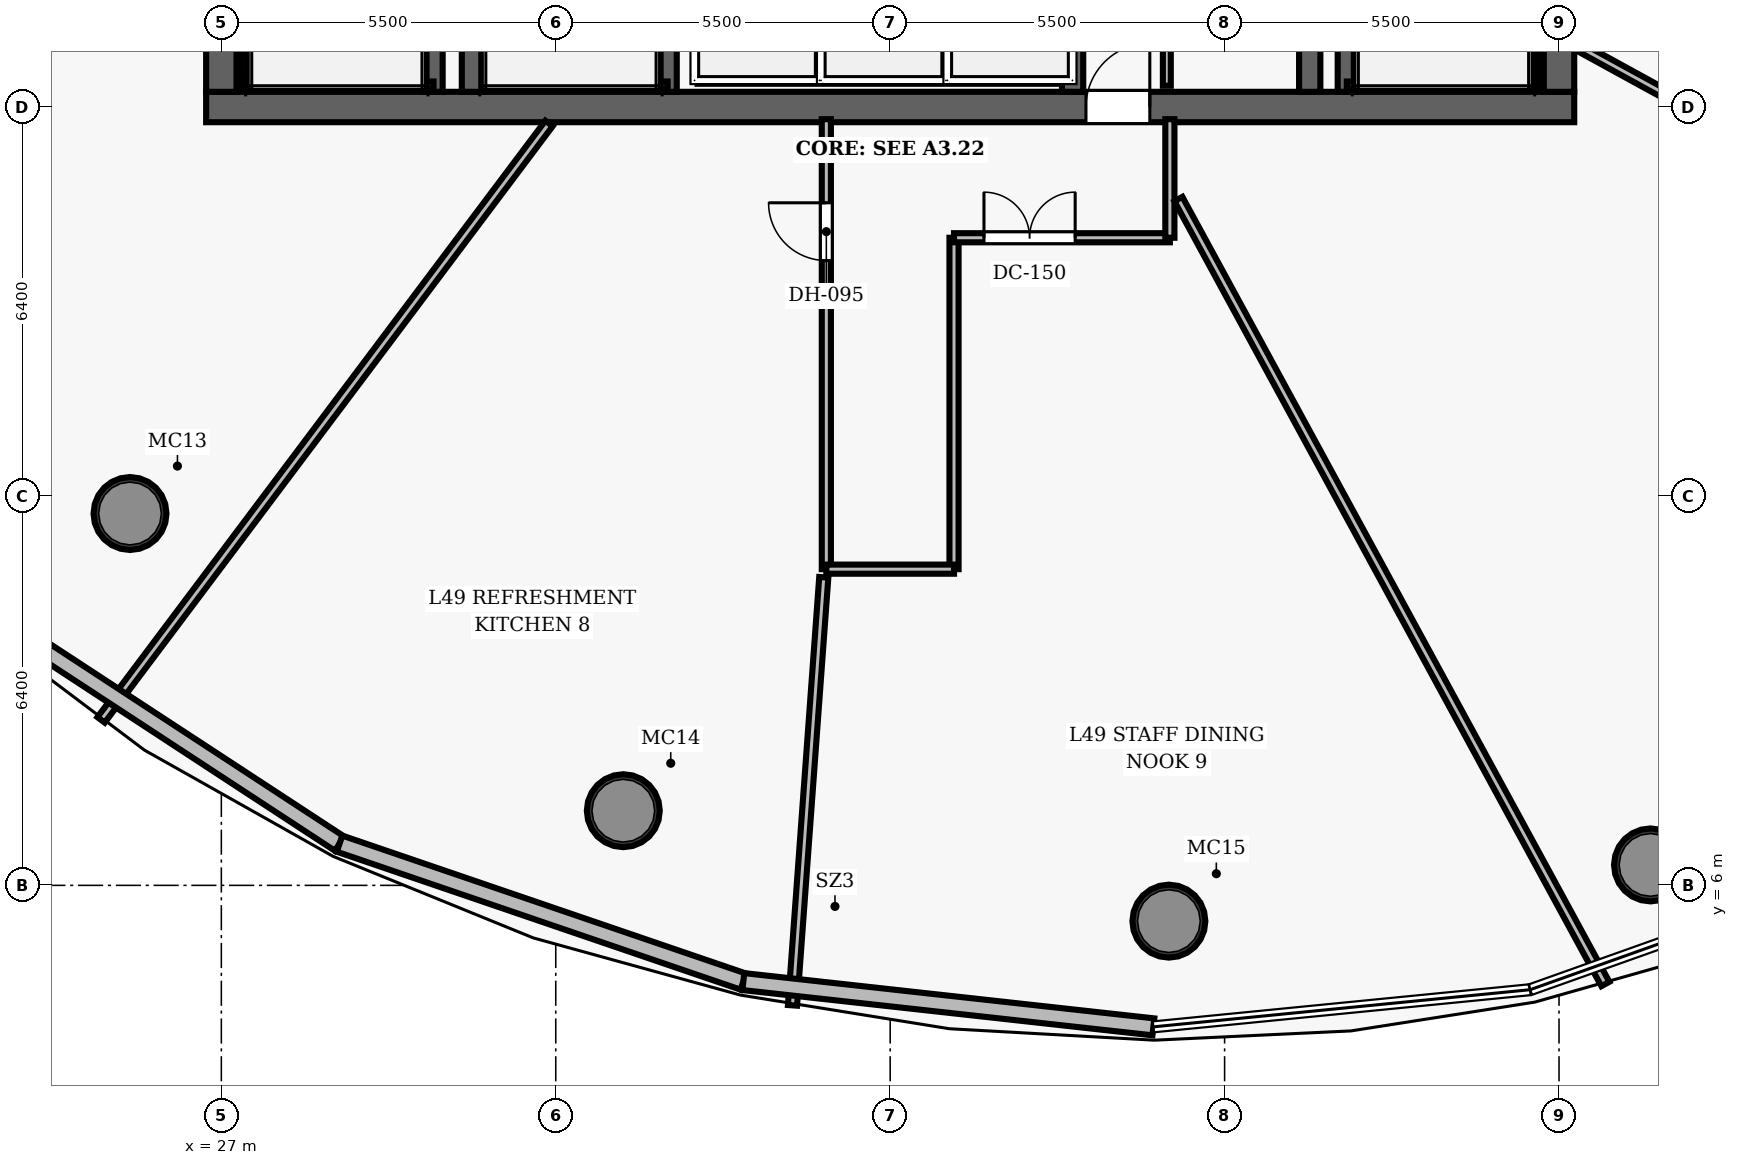
"""IFC4 building model, lengths in metres.
Left out: names, types, materials, properties, quantities, classifications, styles, units other than length and angle.
Written with IfcOpenShell. Run it as: python <this file> out.ifc"""

import sys

from ifc_helpers import new_model, si_unit, direction, frame, frame_2d, origin, origin_2d, place, context, subcontext, project, spatial, rectangle, hollow_circle, extrude, element, fill, save


model = new_model("IFC4")
c1 = context("Model", 3, precision=1e-05, world=origin(), true_north=direction((0.0, 1.0)))
c2 = subcontext(c1, "Body", "Model", "MODEL_VIEW")
j1 = project(units=[si_unit("LENGTHUNIT", "METRE"), si_unit("PLANEANGLEUNIT", "RADIAN")], contexts=[c1])
p1 = place(None, origin())
s1 = spatial("IfcSite", under=j1, at=p1, CompositionType="ELEMENT")
p2 = place(p1, origin())
s2 = spatial("IfcBuilding", under=s1, at=p2, CompositionType="ELEMENT")
p3 = place(p2, frame((0.0, 0.0, 194.3)))
s3 = spatial("IfcBuildingStorey", under=s2, at=p3, CompositionType="ELEMENT", Elevation=194.3)
p4 = place(p3, frame((26.75, 18.8, 0.0), z_axis=(0.0, 0.0, 1.0), x_axis=(1.0, 0.0, 0.0)))
e1 = element("IfcWall", 1, at=p4, inside=s3, PredefinedType="SHEAR", context=c2, shape_type="SweptSolid", body=[
    extrude(rectangle(XDim=22.5, YDim=0.5, at=frame_2d((11.25, 0.0))), origin(), (0.0, 0.0, 1.0), 3.85),
])
p5 = place(p4, frame((14.47, 0.0, 0.0)))
e2 = element("IfcOpeningElement", 2, at=p5, cuts=e1, PredefinedType="OPENING", context=c2, shape_type="SweptSolid", body=[
    extrude(rectangle(XDim=1.05, YDim=2.15, at=frame_2d((0.525, 1.075))), frame((0.0, 0.26, 0.0), z_axis=(0.0, -1.0, 0.0), x_axis=(1.0, 0.0, 0.0)), (0.0, 0.0, 1.0), 0.52),
])
p6 = place(p3, frame((27.0, 19.05, 0.0), z_axis=(0.0, 0.0, 1.0), x_axis=(0.0, 1.0, 0.0)))
e3 = element("IfcWall", 3, at=p6, inside=s3, PredefinedType="SHEAR", context=c2, shape_type="SweptSolid", body=[
    extrude(rectangle(XDim=13.9, YDim=0.5, at=frame_2d((6.95, 0.0))), origin(), (0.0, 0.0, 1.0), 3.85),
])
p7 = place(p6, frame((8.2, 0.0, 0.0)))
e4 = element("IfcOpeningElement", 4, at=p7, cuts=e3, PredefinedType="OPENING", context=c2, shape_type="SweptSolid", body=[
    extrude(rectangle(XDim=1.05, YDim=2.15, at=frame_2d((0.525, 1.075))), frame((0.0, 0.26, 0.0), z_axis=(0.0, -1.0, 0.0), x_axis=(1.0, 0.0, 0.0)), (0.0, 0.0, 1.0), 0.52),
])
p8 = place(p3, frame((49.0, 19.05, 0.0), z_axis=(0.0, 0.0, 1.0), x_axis=(0.0, 1.0, 0.0)))
e5 = element("IfcWall", 5, at=p8, inside=s3, PredefinedType="SHEAR", context=c2, shape_type="SweptSolid", body=[
    extrude(rectangle(XDim=13.9, YDim=0.5, at=frame_2d((6.95, 0.0))), origin(), (0.0, 0.0, 1.0), 3.85),
])
p9 = place(p8, frame((8.2, 0.0, 0.0)))
e6 = element("IfcOpeningElement", 6, at=p9, cuts=e5, PredefinedType="OPENING", context=c2, shape_type="SweptSolid", body=[
    extrude(rectangle(XDim=1.05, YDim=2.15, at=frame_2d((0.525, 1.075))), frame((0.0, 0.26, 0.0), z_axis=(0.0, -1.0, 0.0), x_axis=(1.0, 0.0, 0.0)), (0.0, 0.0, 1.0), 0.52),
])
for number, where, z_axis, x_axis in (
    (7, (31.13, 19.05, 0.0), (0.0, 0.0, 1.0), (0.0, 1.0, 0.0)),
    (8, (44.9, 19.05, 0.0), (0.0, 0.0, 1.0), (0.0, 1.0, 0.0)),
):
    element("IfcWall", number, at=place(p3, frame(where, z_axis=z_axis, x_axis=x_axis)), inside=s3, PredefinedType="SHEAR", context=c2, shape_type="SweptSolid", body=[
        extrude(rectangle(XDim=13.9, YDim=0.35, at=frame_2d((6.95, 0.0))), origin(), (0.0, 0.0, 1.0), 3.85),
    ])
for number, where, z_axis, x_axis in (
    (9, (25.498, 12.115, 0.0), (0.0, 0.0, 1.0), (1.0, 0.0, 0.0)),
    (10, (33.611, 7.228, 0.0), (0.0, 0.0, 1.0), (1.0, 0.0, 0.0)),
    (11, (42.584, 5.412, 0.0), (0.0, 0.0, 1.0), (1.0, 0.0, 0.0)),
    (12, (50.504, 6.336, 0.0), (0.0, 0.0, 1.0), (1.0, 0.0, 0.0)),
):
    element("IfcColumn", number, at=place(p3, frame(where, z_axis=z_axis, x_axis=x_axis)), inside=s3, PredefinedType="COLUMN", context=c2, shape_type="SweptSolid", body=[
        extrude(hollow_circle(Radius=0.6, WallThickness=0.05, at=origin_2d()), origin(), (0.0, 0.0, 1.0), 3.85),
    ])
p10 = place(p3, frame((30.49, 19.05, 0.0), z_axis=(0.0, 0.0, 1.0), x_axis=(0.0, 1.0, 0.0)))
e13 = element("IfcWall", 13, at=p10, inside=s3, PredefinedType="SHEAR", context=c2, shape_type="SweptSolid", body=[
    extrude(rectangle(XDim=7.5, YDim=0.3, at=frame_2d((3.75, 0.0))), origin(), (0.0, 0.0, 1.0), 3.85),
])
p11 = place(p3, frame((27.395, 19.1, 0.0), z_axis=(0.0, 0.0, 1.0), x_axis=(0.0, 1.0, 0.0)))
e14 = element("IfcWall", 14, at=p11, inside=s3, PredefinedType="SHEAR", context=c2, shape_type="SweptSolid", body=[
    extrude(rectangle(XDim=7.45, YDim=0.12, at=frame_2d((3.725, 0.0))), origin(), (0.0, 0.0, 1.0), 3.85),
])
p12 = place(p3, frame((27.395, 19.16, 0.0), z_axis=(0.0, 0.0, 1.0), x_axis=(1.0, 0.0, 0.0)))
e15 = element("IfcWall", 15, at=p12, inside=s3, PredefinedType="SHEAR", context=c2, shape_type="SweptSolid", body=[
    extrude(rectangle(XDim=3.095, YDim=0.12, at=frame_2d((1.547, 0.0))), origin(), (0.0, 0.0, 1.0), 3.85),
])
p13 = place(p3, frame((45.51, 19.05, 0.0), z_axis=(0.0, 0.0, 1.0), x_axis=(0.0, 1.0, 0.0)))
e16 = element("IfcWall", 16, at=p13, inside=s3, PredefinedType="SHEAR", context=c2, shape_type="SweptSolid", body=[
    extrude(rectangle(XDim=7.5, YDim=0.3, at=frame_2d((3.75, 0.0))), origin(), (0.0, 0.0, 1.0), 3.85),
])
p14 = place(p3, frame((48.605, 19.1, 0.0), z_axis=(0.0, 0.0, 1.0), x_axis=(0.0, 1.0, 0.0)))
e17 = element("IfcWall", 17, at=p14, inside=s3, PredefinedType="SHEAR", context=c2, shape_type="SweptSolid", body=[
    extrude(rectangle(XDim=7.45, YDim=0.12, at=frame_2d((3.725, 0.0))), origin(), (0.0, 0.0, 1.0), 3.85),
])
p15 = place(p3, frame((45.51, 19.16, 0.0), z_axis=(0.0, 0.0, 1.0), x_axis=(1.0, 0.0, 0.0)))
e18 = element("IfcWall", 18, at=p15, inside=s3, PredefinedType="SHEAR", context=c2, shape_type="SweptSolid", body=[
    extrude(rectangle(XDim=3.095, YDim=0.12, at=frame_2d((1.547, 0.0))), origin(), (0.0, 0.0, 1.0), 3.85),
])
p16 = place(p3, frame((34.34, 19.05, 0.0), z_axis=(0.0, 0.0, 1.0), x_axis=(0.0, 1.0, 0.0)))
e19 = element("IfcWall", 19, at=p16, inside=s3, PredefinedType="SHEAR", context=c2, shape_type="SweptSolid", body=[
    extrude(rectangle(XDim=7.5, YDim=0.3, at=frame_2d((3.75, 0.0))), origin(), (0.0, 0.0, 1.0), 3.85),
])
p17 = place(p3, frame((31.3, 19.16, 0.0), z_axis=(0.0, 0.0, 1.0), x_axis=(1.0, 0.0, 0.0)))
e20 = element("IfcWall", 20, at=p17, inside=s3, PredefinedType="SHEAR", context=c2, shape_type="SweptSolid", body=[
    extrude(rectangle(XDim=3.04, YDim=0.12, at=frame_2d((1.52, 0.0))), origin(), (0.0, 0.0, 1.0), 3.85),
])
p18 = place(p3, frame((41.0, 19.05, 0.0), z_axis=(0.0, 0.0, 1.0), x_axis=(0.0, 1.0, 0.0)))
e21 = element("IfcWall", 21, at=p18, inside=s3, PredefinedType="SHEAR", context=c2, shape_type="SweptSolid", body=[
    extrude(rectangle(XDim=2.08, YDim=0.35, at=frame_2d((1.04, 0.0))), origin(), (0.0, 0.0, 1.0), 3.035),
])
p19 = place(p3, frame((42.55, 19.15, 0.0), z_axis=(0.0, 0.0, 1.0), x_axis=(0.0, 1.0, 0.0)))
e22 = element("IfcWall", 22, at=p19, inside=s3, PredefinedType="PARTITIONING", context=c2, shape_type="SweptSolid", body=[
    extrude(rectangle(XDim=2.75, YDim=0.13, at=frame_2d((1.375, 0.0))), origin(), (0.0, 0.0, 1.0), 3.035),
])
p20 = place(p19, frame((0.65, 0.0, 0.0)))
e23 = element("IfcOpeningElement", 23, at=p20, cuts=e22, PredefinedType="OPENING", context=c2, shape_type="SweptSolid", body=[
    extrude(rectangle(XDim=0.85, YDim=2.1, at=frame_2d((0.425, 1.05))), frame((0.0, 0.075, 0.0), z_axis=(0.0, -1.0, 0.0), x_axis=(1.0, 0.0, 0.0)), (0.0, 0.0, 1.0), 0.15),
])
p21 = place(p3, frame((36.95, 11.2, 0.0), z_axis=(0.0, 0.0, 1.0), x_axis=(0.0, 1.0, 0.0)))
e24 = element("IfcWall", 24, at=p21, inside=s3, PredefinedType="PARTITIONING", context=c2, shape_type="SweptSolid", body=[
    extrude(rectangle(XDim=7.4, YDim=0.15, at=frame_2d((3.7, 0.0))), origin(), (0.0, 0.0, 1.0), 3.035),
])
p22 = place(p21, frame((5.075, 0.0, 0.0)))
e25 = element("IfcOpeningElement", 25, at=p22, cuts=e24, PredefinedType="OPENING", context=c2, shape_type="SweptSolid", body=[
    extrude(rectangle(XDim=0.95, YDim=2.15, at=frame_2d((0.475, 1.075))), frame((0.0, 0.085, 0.0), z_axis=(0.0, -1.0, 0.0), x_axis=(1.0, 0.0, 0.0)), (0.0, 0.0, 1.0), 0.17),
])
p23 = place(p3, frame((39.05, 11.2, 0.0), z_axis=(0.0, 0.0, 1.0), x_axis=(0.0, 1.0, 0.0)))
e26 = element("IfcWall", 26, at=p23, inside=s3, PredefinedType="PARTITIONING", context=c2, shape_type="SweptSolid", body=[
    extrude(rectangle(XDim=5.45, YDim=0.15, at=frame_2d((2.725, 0.0))), origin(), (0.0, 0.0, 1.0), 3.035),
])
p24 = place(p3, frame((39.05, 16.65, 0.0), z_axis=(0.0, 0.0, 1.0), x_axis=(1.0, 0.0, 0.0)))
e27 = element("IfcWall", 27, at=p24, inside=s3, PredefinedType="PARTITIONING", context=c2, shape_type="SweptSolid", body=[
    extrude(rectangle(XDim=3.55, YDim=0.15, at=frame_2d((1.775, 0.0))), origin(), (0.0, 0.0, 1.0), 3.035),
])
p25 = place(p24, frame((0.492, 0.0, 0.0)))
e28 = element("IfcOpeningElement", 28, at=p25, cuts=e27, PredefinedType="OPENING", context=c2, shape_type="SweptSolid", body=[
    extrude(rectangle(XDim=1.5, YDim=2.2, at=frame_2d((0.75, 1.1))), frame((0.0, 0.085, 0.0), z_axis=(0.0, -1.0, 0.0), x_axis=(1.0, 0.0, 0.0)), (0.0, 0.0, 1.0), 0.17),
])
p26 = place(p3, frame((42.6, 16.65, 0.0), z_axis=(0.0, 0.0, 1.0), x_axis=(0.0, 1.0, 0.0)))
e29 = element("IfcWall", 29, at=p26, inside=s3, PredefinedType="PARTITIONING", context=c2, shape_type="SweptSolid", body=[
    extrude(rectangle(XDim=1.95, YDim=0.15, at=frame_2d((0.975, 0.0))), origin(), (0.0, 0.0, 1.0), 3.035),
])
p27 = place(p3, frame((36.95, 11.2, 0.0), z_axis=(0.0, 0.0, 1.0), x_axis=(1.0, 0.0, 0.0)))
e30 = element("IfcWall", 30, at=p27, inside=s3, PredefinedType="PARTITIONING", context=c2, shape_type="SweptSolid", body=[
    extrude(rectangle(XDim=2.1, YDim=0.15, at=frame_2d((1.05, 0.0))), origin(), (0.0, 0.0, 1.0), 3.035),
])
p28 = place(p3, frame((26.73, 21.817, 0.0), z_axis=(0.0, 0.0, 1.0), x_axis=(-0.937498671768, -0.347988851018, 0.0)))
e31 = element("IfcWall", 31, at=p28, inside=s3, PredefinedType="PARTITIONING", context=c2, shape_type="SweptSolid", body=[
    extrude(rectangle(XDim=10.667, YDim=0.15, at=frame_2d((5.334, 0.0))), origin(), (0.0, 0.0, 1.0), 3.035),
])
p29 = place(p3, frame((32.389, 18.53, 0.0), z_axis=(0.0, 0.0, 1.0), x_axis=(-0.600541177599, -0.799593830646, 0.0)))
e32 = element("IfcWall", 32, at=p29, inside=s3, PredefinedType="PARTITIONING", context=c2, shape_type="SweptSolid", body=[
    extrude(rectangle(XDim=12.268, YDim=0.15, at=frame_2d((6.134, 0.0))), origin(), (0.0, 0.0, 1.0), 3.035),
])
p30 = place(p3, frame((36.908, 11.066, 0.0), z_axis=(0.0, 0.0, 1.0), x_axis=(-0.072945430334, -0.997335933471, 0.0)))
e33 = element("IfcWall", 33, at=p30, inside=s3, PredefinedType="PARTITIONING", context=c2, shape_type="SweptSolid", body=[
    extrude(rectangle(XDim=7.059, YDim=0.15, at=frame_2d((3.529, 0.0))), origin(), (0.0, 0.0, 1.0), 3.035),
])
p31 = place(p3, frame((42.74, 17.287, 0.0), z_axis=(0.0, 0.0, 1.0), x_axis=(0.477854270456, -0.87843912493, 0.0)))
e34 = element("IfcWall", 34, at=p31, inside=s3, PredefinedType="PARTITIONING", context=c2, shape_type="SweptSolid", body=[
    extrude(rectangle(XDim=14.695, YDim=0.15, at=frame_2d((7.348, 0.0))), origin(), (0.0, 0.0, 1.0), 3.035),
])
p32 = place(p3, frame((49.27, 19.823, 0.0), z_axis=(0.0, 0.0, 1.0), x_axis=(0.876915815603, -0.480643997513, 0.0)))
e35 = element("IfcWall", 35, at=p32, inside=s3, PredefinedType="PARTITIONING", context=c2, shape_type="SweptSolid", body=[
    extrude(rectangle(XDim=12.584, YDim=0.15, at=frame_2d((6.292, 0.0))), origin(), (0.0, 0.0, 1.0), 3.035),
])
p33 = place(p3, frame((28.944, 6.686, 0.0), z_axis=(0.0, 0.0, 1.0), x_axis=(-0.836722302194, 0.547627418059, 0.0)))
e36 = element("IfcWall", 36, at=p33, inside=s3, PredefinedType="SOLIDWALL", context=c2, shape_type="SweptSolid", body=[
    extrude(rectangle(XDim=7.046, YDim=0.28, at=frame_2d((3.523, 0.0))), origin(), (0.0, 0.0, 1.0), 3.62),
])
p34 = place(p3, frame((35.585, 4.417, 0.0), z_axis=(0.0, 0.0, 1.0), x_axis=(-0.946319491837, 0.323232763452, 0.0)))
e37 = element("IfcWall", 37, at=p34, inside=s3, PredefinedType="SOLIDWALL", context=c2, shape_type="SweptSolid", body=[
    extrude(rectangle(XDim=7.018, YDim=0.28, at=frame_2d((3.509, 0.0))), origin(), (0.0, 0.0, 1.0), 3.62),
])
p35 = place(p3, frame((42.329, 3.673, 0.0), z_axis=(0.0, 0.0, 1.0), x_axis=(-0.993962906712, 0.109716635384, 0.0)))
e38 = element("IfcWall", 38, at=p35, inside=s3, PredefinedType="SOLIDWALL", context=c2, shape_type="SweptSolid", body=[
    extrude(rectangle(XDim=6.785, YDim=0.28, at=frame_2d((3.392, 0.0))), origin(), (0.0, 0.0, 1.0), 3.62),
])
p36 = place(p5, origin())
e39 = element("IfcDoor", 39, at=p36, inside=s3, OperationType="SINGLE_SWING_RIGHT", PredefinedType="DOOR", context=c2, shape_type="SweptSolid", body=[
    extrude(rectangle(XDim=1.05, YDim=2.15, at=frame_2d((0.525, 1.075))), frame((0.0, 0.025, 0.0), z_axis=(0.0, -1.0, 0.0), x_axis=(1.0, 0.0, 0.0)), (0.0, 0.0, 1.0), 0.05),
])
fill(e2, e39)
p37 = place(p22, origin())
e40 = element("IfcDoor", 40, at=p37, inside=s3, OperationType="SINGLE_SWING_RIGHT", PredefinedType="DOOR", context=c2, shape_type="SweptSolid", body=[
    extrude(rectangle(XDim=0.95, YDim=2.15, at=frame_2d((0.475, 1.075))), frame((0.0, 0.025, 0.0), z_axis=(0.0, -1.0, 0.0), x_axis=(1.0, 0.0, 0.0)), (0.0, 0.0, 1.0), 0.05),
])
fill(e25, e40)
p38 = place(p25, origin())
e41 = element("IfcDoor", 41, at=p38, inside=s3, OperationType="DOUBLE_DOOR_SINGLE_SWING", PredefinedType="DOOR", context=c2, shape_type="SweptSolid", body=[
    extrude(rectangle(XDim=1.5, YDim=2.2, at=frame_2d((0.75, 1.1))), frame((0.0, 0.025, 0.0), z_axis=(0.0, -1.0, 0.0), x_axis=(1.0, 0.0, 0.0)), (0.0, 0.0, 1.0), 0.05),
])
fill(e28, e41)
save(model, sys.argv[1])
